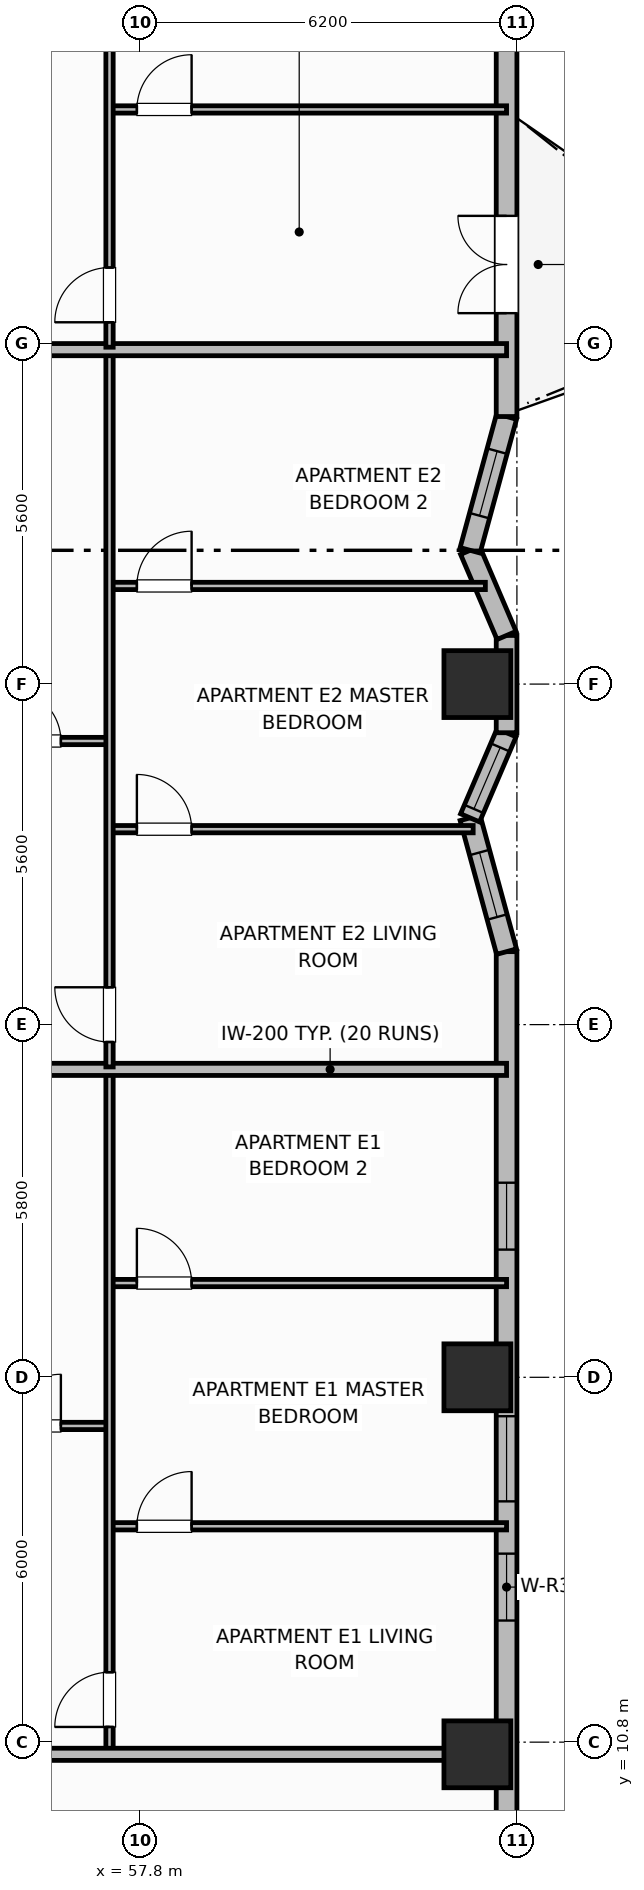
"""IFC4 building model, lengths in metres.
Left out: names, types, materials, properties, quantities, classifications, styles, units other than length and angle.
Written with IfcOpenShell. Run it as: python <this file> out.ifc"""

import sys

from ifc_helpers import new_model, si_unit, direction, frame, frame_2d, origin, origin_2d, place, context, subcontext, project, spatial, rectangle, extrude, element, fill, save


model = new_model("IFC4")
c1 = context("Model", 3, precision=1e-05, world=origin(), true_north=direction((0.0, 1.0)))
c2 = subcontext(c1, "Body", "Model", "MODEL_VIEW")
j1 = project(units=[si_unit("LENGTHUNIT", "METRE"), si_unit("PLANEANGLEUNIT", "RADIAN")], contexts=[c1])
p1 = place(None, origin())
s1 = spatial("IfcSite", under=j1, at=p1, CompositionType="ELEMENT")
p2 = place(p1, origin())
s2 = spatial("IfcBuilding", under=s1, at=p2, CompositionType="ELEMENT")
p3 = place(p2, frame((0.0, 0.0, 92.0)))
s3 = spatial("IfcBuildingStorey", under=s2, at=p3, CompositionType="ELEMENT", Elevation=92.0)
for number, where, z_axis, x_axis in (
    (1, (63.35, 10.6, 0.0), (0.0, 0.0, 1.0), (1.0, 0.0, 0.0)),
    (2, (63.35, 16.8, 0.0), (0.0, 0.0, 1.0), (1.0, 0.0, 0.0)),
    (3, (63.35, 28.2, 0.0), (0.0, 0.0, 1.0), (1.0, 0.0, 0.0)),
):
    element("IfcColumn", number, at=place(p3, frame(where, z_axis=z_axis, x_axis=x_axis)), inside=s3, PredefinedType="COLUMN", context=c2, shape_type="SweptSolid", body=[
        extrude(rectangle(XDim=1.1, YDim=1.1, at=origin_2d()), origin(), (0.0, 0.0, 1.0), 3.7),
    ])
p4 = place(p3, frame((63.83, 9.0, 0.0), z_axis=(0.0, 0.0, 1.0), x_axis=(0.0, 1.0, 0.0)))
e4 = element("IfcWall", 4, at=p4, inside=s3, PredefinedType="SOLIDWALL", context=c2, shape_type="SweptSolid", body=[
    extrude(rectangle(XDim=14.8, YDim=0.34, at=frame_2d((7.4, 0.0))), origin(), (0.0, 0.0, 1.0), 2.7),
])
p5 = place(p4, frame((3.8, 0.0, 0.93)))
e5 = element("IfcOpeningElement", 5, at=p5, cuts=e4, PredefinedType="OPENING", context=c2, shape_type="SweptSolid", body=[
    extrude(rectangle(XDim=1.1, YDim=1.65, at=frame_2d((0.55, 0.825))), frame((0.0, 0.18, 0.0), z_axis=(0.0, -1.0, 0.0), x_axis=(1.0, 0.0, 0.0)), (0.0, 0.0, 1.0), 0.36),
])
p6 = place(p4, frame((5.76, 0.0, 0.69)))
e6 = element("IfcOpeningElement", 6, at=p6, cuts=e4, PredefinedType="OPENING", context=c2, shape_type="SweptSolid", body=[
    extrude(rectangle(XDim=1.4, YDim=1.85, at=frame_2d((0.7, 0.925))), frame((0.0, 0.18, 0.0), z_axis=(0.0, -1.0, 0.0), x_axis=(1.0, 0.0, 0.0)), (0.0, 0.0, 1.0), 0.36),
])
p7 = place(p4, frame((9.9, 0.0, 0.93)))
e7 = element("IfcOpeningElement", 7, at=p7, cuts=e4, PredefinedType="OPENING", context=c2, shape_type="SweptSolid", body=[
    extrude(rectangle(XDim=1.1, YDim=1.65, at=frame_2d((0.55, 0.825))), frame((0.0, 0.18, 0.0), z_axis=(0.0, -1.0, 0.0), x_axis=(1.0, 0.0, 0.0)), (0.0, 0.0, 1.0), 0.36),
])
p8 = place(p3, frame((63.83, 23.8, 0.0), z_axis=(0.0, 0.0, 1.0), x_axis=(-0.263162701705, 0.964751466665, 0.0)))
e8 = element("IfcWall", 8, at=p8, inside=s3, PredefinedType="SOLIDWALL", context=c2, shape_type="SweptSolid", body=[
    extrude(rectangle(XDim=2.28, YDim=0.34, at=frame_2d((1.14, 0.0))), origin(), (0.0, 0.0, 1.0), 2.7),
])
p9 = place(p8, frame((0.59, 0.0, 0.89)))
e9 = element("IfcOpeningElement", 9, at=p9, cuts=e8, PredefinedType="OPENING", context=c2, shape_type="SweptSolid", body=[
    extrude(rectangle(XDim=1.1, YDim=1.65, at=frame_2d((0.55, 0.825))), frame((0.0, 0.18, 0.0), z_axis=(0.0, -1.0, 0.0), x_axis=(1.0, 0.0, 0.0)), (0.0, 0.0, 1.0), 0.36),
])
p10 = place(p3, frame((63.23, 26.0, 0.0), z_axis=(0.0, 0.0, 1.0), x_axis=(0.39399667932, 0.919111862988, 0.0)))
e10 = element("IfcWall", 10, at=p10, inside=s3, PredefinedType="SOLIDWALL", context=c2, shape_type="SweptSolid", body=[
    extrude(rectangle(XDim=1.523, YDim=0.34, at=frame_2d((0.762, 0.0))), origin(), (0.0, 0.0, 1.0), 2.7),
])
p11 = place(p10, frame((0.16, 0.0, 0.89)))
e11 = element("IfcOpeningElement", 11, at=p11, cuts=e10, PredefinedType="OPENING", context=c2, shape_type="SweptSolid", body=[
    extrude(rectangle(XDim=1.1, YDim=1.65, at=frame_2d((0.55, 0.825))), frame((0.0, 0.18, 0.0), z_axis=(0.0, -1.0, 0.0), x_axis=(1.0, 0.0, 0.0)), (0.0, 0.0, 1.0), 0.36),
])
p12 = place(p3, frame((63.83, 27.4, 0.0), z_axis=(0.0, 0.0, 1.0), x_axis=(0.0, 1.0, 0.0)))
e12 = element("IfcWall", 12, at=p12, inside=s3, PredefinedType="SOLIDWALL", context=c2, shape_type="SweptSolid", body=[
    extrude(rectangle(XDim=1.6, YDim=0.34, at=frame_2d((0.8, 0.0))), origin(), (0.0, 0.0, 1.0), 2.7),
])
p13 = place(p3, frame((63.83, 29.0, 0.0), z_axis=(0.0, 0.0, 1.0), x_axis=(-0.39399667932, 0.919111862988, 0.0)))
e13 = element("IfcWall", 13, at=p13, inside=s3, PredefinedType="SOLIDWALL", context=c2, shape_type="SweptSolid", body=[
    extrude(rectangle(XDim=1.523, YDim=0.34, at=frame_2d((0.762, 0.0))), origin(), (0.0, 0.0, 1.0), 2.7),
])
p14 = place(p3, frame((63.23, 30.4, 0.0), z_axis=(0.0, 0.0, 1.0), x_axis=(0.263135522356, 0.964758880174, 0.0)))
e14 = element("IfcWall", 14, at=p14, inside=s3, PredefinedType="SOLIDWALL", context=c2, shape_type="SweptSolid", body=[
    extrude(rectangle(XDim=2.281, YDim=0.34, at=frame_2d((1.14, 0.0))), origin(), (0.0, 0.0, 1.0), 2.7),
])
p15 = place(p14, frame((0.59, 0.0, 0.89)))
e15 = element("IfcOpeningElement", 15, at=p15, cuts=e14, PredefinedType="OPENING", context=c2, shape_type="SweptSolid", body=[
    extrude(rectangle(XDim=1.1, YDim=1.65, at=frame_2d((0.55, 0.825))), frame((0.0, 0.18, 0.0), z_axis=(0.0, -1.0, 0.0), x_axis=(1.0, 0.0, 0.0)), (0.0, 0.0, 1.0), 0.36),
])
p16 = place(p3, frame((63.83, 32.6, 0.0), z_axis=(0.0, 0.0, 1.0), x_axis=(0.0, 1.0, 0.0)))
e16 = element("IfcWall", 16, at=p16, inside=s3, PredefinedType="SOLIDWALL", context=c2, shape_type="SweptSolid", body=[
    extrude(rectangle(XDim=14.8, YDim=0.34, at=frame_2d((7.4, 0.0))), origin(), (0.0, 0.0, 1.0), 2.7),
])
p17 = place(p16, frame((1.7, 0.0, 0.0)))
e17 = element("IfcOpeningElement", 17, at=p17, cuts=e16, PredefinedType="OPENING", context=c2, shape_type="SweptSolid", body=[
    extrude(rectangle(XDim=1.6, YDim=2.1, at=frame_2d((0.8, 1.05))), frame((0.0, 0.18, 0.0), z_axis=(0.0, -1.0, 0.0), x_axis=(1.0, 0.0, 0.0)), (0.0, 0.0, 1.0), 0.36),
])
p18 = place(p16, frame((7.6, 0.0, 0.69)))
e18 = element("IfcOpeningElement", 18, at=p18, cuts=e16, PredefinedType="OPENING", context=c2, shape_type="SweptSolid", body=[
    extrude(rectangle(XDim=1.4, YDim=1.85, at=frame_2d((0.7, 0.925))), frame((0.0, 0.18, 0.0), z_axis=(0.0, -1.0, 0.0), x_axis=(1.0, 0.0, 0.0)), (0.0, 0.0, 1.0), 0.36),
])
p19 = place(p16, frame((9.8, 0.0, 0.68)))
e19 = element("IfcOpeningElement", 19, at=p19, cuts=e16, PredefinedType="OPENING", context=c2, shape_type="SweptSolid", body=[
    extrude(rectangle(XDim=2.1, YDim=1.9, at=frame_2d((1.05, 0.95))), frame((0.0, 0.18, 0.0), z_axis=(0.0, -1.0, 0.0), x_axis=(1.0, 0.0, 0.0)), (0.0, 0.0, 1.0), 0.36),
])
p20 = place(p3, frame((55.05, 16.0, 0.0), z_axis=(0.0, 0.0, 1.0), x_axis=(1.0, 0.0, 0.0)))
e20 = element("IfcWall", 20, at=p20, inside=s3, PredefinedType="PARTITIONING", context=c2, shape_type="SweptSolid", body=[
    extrude(rectangle(XDim=2.25, YDim=0.12, at=frame_2d((1.125, 0.0))), origin(), (0.0, 0.0, 1.0), 2.53),
])
p21 = place(p20, frame((0.6, 0.0, 0.0)))
e21 = element("IfcOpeningElement", 21, at=p21, cuts=e20, PredefinedType="OPENING", context=c2, shape_type="SweptSolid", body=[
    extrude(rectangle(XDim=0.85, YDim=2.1, at=frame_2d((0.425, 1.05))), frame((0.0, 0.07, 0.0), z_axis=(0.0, -1.0, 0.0), x_axis=(1.0, 0.0, 0.0)), (0.0, 0.0, 1.0), 0.14),
])
p22 = place(p3, frame((57.3, 14.35, 0.0), z_axis=(0.0, 0.0, 1.0), x_axis=(1.0, 0.0, 0.0)))
e22 = element("IfcWall", 22, at=p22, inside=s3, PredefinedType="PARTITIONING", context=c2, shape_type="SweptSolid", body=[
    extrude(rectangle(XDim=6.53, YDim=0.12, at=frame_2d((3.265, 0.0))), origin(), (0.0, 0.0, 1.0), 2.53),
])
p23 = place(p22, frame((0.45, 0.0, 0.0)))
e23 = element("IfcOpeningElement", 23, at=p23, cuts=e22, PredefinedType="OPENING", context=c2, shape_type="SweptSolid", body=[
    extrude(rectangle(XDim=0.9, YDim=2.1, at=frame_2d((0.45, 1.05))), frame((0.0, 0.07, 0.0), z_axis=(0.0, -1.0, 0.0), x_axis=(1.0, 0.0, 0.0)), (0.0, 0.0, 1.0), 0.14),
])
p24 = place(p3, frame((57.3, 18.35, 0.0), z_axis=(0.0, 0.0, 1.0), x_axis=(1.0, 0.0, 0.0)))
e24 = element("IfcWall", 24, at=p24, inside=s3, PredefinedType="PARTITIONING", context=c2, shape_type="SweptSolid", body=[
    extrude(rectangle(XDim=6.53, YDim=0.12, at=frame_2d((3.265, 0.0))), origin(), (0.0, 0.0, 1.0), 2.53),
])
p25 = place(p24, frame((0.45, 0.0, 0.0)))
e25 = element("IfcOpeningElement", 25, at=p25, cuts=e24, PredefinedType="OPENING", context=c2, shape_type="SweptSolid", body=[
    extrude(rectangle(XDim=0.9, YDim=2.1, at=frame_2d((0.45, 1.05))), frame((0.0, 0.07, 0.0), z_axis=(0.0, -1.0, 0.0), x_axis=(1.0, 0.0, 0.0)), (0.0, 0.0, 1.0), 0.14),
])
p26 = place(p3, frame((57.3, 10.64, 0.0), z_axis=(0.0, 0.0, 1.0), x_axis=(0.0, 1.0, 0.0)))
e26 = element("IfcWall", 26, at=p26, inside=s3, PredefinedType="PARTITIONING", context=c2, shape_type="SweptSolid", body=[
    extrude(rectangle(XDim=11.184, YDim=0.12, at=frame_2d((5.592, 0.0))), origin(), (0.0, 0.0, 1.0), 2.53),
])
p27 = place(p26, frame((0.41, 0.0, 0.0)))
e27 = element("IfcOpeningElement", 27, at=p27, cuts=e26, PredefinedType="OPENING", context=c2, shape_type="SweptSolid", body=[
    extrude(rectangle(XDim=0.9, YDim=2.1, at=frame_2d((0.45, 1.05))), frame((0.0, 0.07, 0.0), z_axis=(0.0, -1.0, 0.0), x_axis=(1.0, 0.0, 0.0)), (0.0, 0.0, 1.0), 0.14),
])
p28 = place(p3, frame((55.05, 21.864, 0.0), z_axis=(0.0, 0.0, 1.0), x_axis=(1.0, 0.0, 0.0)))
e28 = element("IfcWall", 28, at=p28, inside=s3, PredefinedType="PARTITIONING", context=c2, shape_type="SweptSolid", body=[
    extrude(rectangle(XDim=8.78, YDim=0.2, at=frame_2d((4.39, 0.0))), origin(), (0.0, 0.0, 1.0), 2.53),
])
p29 = place(p3, frame((55.05, 27.264, 0.0), z_axis=(0.0, 0.0, 1.0), x_axis=(1.0, 0.0, 0.0)))
e29 = element("IfcWall", 29, at=p29, inside=s3, PredefinedType="PARTITIONING", context=c2, shape_type="SweptSolid", body=[
    extrude(rectangle(XDim=2.25, YDim=0.12, at=frame_2d((1.125, 0.0))), origin(), (0.0, 0.0, 1.0), 2.53),
])
p30 = place(p29, frame((0.6, 0.0, 0.0)))
e30 = element("IfcOpeningElement", 30, at=p30, cuts=e29, PredefinedType="OPENING", context=c2, shape_type="SweptSolid", body=[
    extrude(rectangle(XDim=0.85, YDim=2.1, at=frame_2d((0.425, 1.05))), frame((0.0, 0.07, 0.0), z_axis=(0.0, -1.0, 0.0), x_axis=(1.0, 0.0, 0.0)), (0.0, 0.0, 1.0), 0.14),
])
p31 = place(p3, frame((57.3, 25.814, 0.0), z_axis=(0.0, 0.0, 1.0), x_axis=(1.0, 0.0, 0.0)))
e31 = element("IfcWall", 31, at=p31, inside=s3, PredefinedType="PARTITIONING", context=c2, shape_type="SweptSolid", body=[
    extrude(rectangle(XDim=5.981, YDim=0.12, at=frame_2d((2.99, 0.0))), origin(), (0.0, 0.0, 1.0), 2.53),
])
p32 = place(p31, frame((0.45, 0.0, 0.0)))
e32 = element("IfcOpeningElement", 32, at=p32, cuts=e31, PredefinedType="OPENING", context=c2, shape_type="SweptSolid", body=[
    extrude(rectangle(XDim=0.9, YDim=2.1, at=frame_2d((0.45, 1.05))), frame((0.0, 0.07, 0.0), z_axis=(0.0, -1.0, 0.0), x_axis=(1.0, 0.0, 0.0)), (0.0, 0.0, 1.0), 0.14),
])
p33 = place(p3, frame((57.3, 29.814, 0.0), z_axis=(0.0, 0.0, 1.0), x_axis=(1.0, 0.0, 0.0)))
e33 = element("IfcWall", 33, at=p33, inside=s3, PredefinedType="PARTITIONING", context=c2, shape_type="SweptSolid", body=[
    extrude(rectangle(XDim=6.181, YDim=0.12, at=frame_2d((3.091, 0.0))), origin(), (0.0, 0.0, 1.0), 2.53),
])
p34 = place(p33, frame((0.45, 0.0, 0.0)))
e34 = element("IfcOpeningElement", 34, at=p34, cuts=e33, PredefinedType="OPENING", context=c2, shape_type="SweptSolid", body=[
    extrude(rectangle(XDim=0.9, YDim=2.1, at=frame_2d((0.45, 1.05))), frame((0.0, 0.07, 0.0), z_axis=(0.0, -1.0, 0.0), x_axis=(1.0, 0.0, 0.0)), (0.0, 0.0, 1.0), 0.14),
])
p35 = place(p3, frame((57.3, 21.904, 0.0), z_axis=(0.0, 0.0, 1.0), x_axis=(0.0, 1.0, 0.0)))
e35 = element("IfcWall", 35, at=p35, inside=s3, PredefinedType="PARTITIONING", context=c2, shape_type="SweptSolid", body=[
    extrude(rectangle(XDim=11.756, YDim=0.12, at=frame_2d((5.878, 0.0))), origin(), (0.0, 0.0, 1.0), 2.53),
])
p36 = place(p35, frame((0.41, 0.0, 0.0)))
e36 = element("IfcOpeningElement", 36, at=p36, cuts=e35, PredefinedType="OPENING", context=c2, shape_type="SweptSolid", body=[
    extrude(rectangle(XDim=0.9, YDim=2.1, at=frame_2d((0.45, 1.05))), frame((0.0, 0.07, 0.0), z_axis=(0.0, -1.0, 0.0), x_axis=(1.0, 0.0, 0.0)), (0.0, 0.0, 1.0), 0.14),
])
p37 = place(p3, frame((55.05, 33.7, 0.0), z_axis=(0.0, 0.0, 1.0), x_axis=(1.0, 0.0, 0.0)))
e37 = element("IfcWall", 37, at=p37, inside=s3, PredefinedType="PARTITIONING", context=c2, shape_type="SweptSolid", body=[
    extrude(rectangle(XDim=8.78, YDim=0.2, at=frame_2d((4.39, 0.0))), origin(), (0.0, 0.0, 1.0), 2.53),
])
p38 = place(p3, frame((57.3, 37.65, 0.0), z_axis=(0.0, 0.0, 1.0), x_axis=(1.0, 0.0, 0.0)))
e38 = element("IfcWall", 38, at=p38, inside=s3, PredefinedType="PARTITIONING", context=c2, shape_type="SweptSolid", body=[
    extrude(rectangle(XDim=6.53, YDim=0.12, at=frame_2d((3.265, 0.0))), origin(), (0.0, 0.0, 1.0), 2.53),
])
p39 = place(p38, frame((0.45, 0.0, 0.0)))
e39 = element("IfcOpeningElement", 39, at=p39, cuts=e38, PredefinedType="OPENING", context=c2, shape_type="SweptSolid", body=[
    extrude(rectangle(XDim=0.9, YDim=2.1, at=frame_2d((0.45, 1.05))), frame((0.0, 0.07, 0.0), z_axis=(0.0, -1.0, 0.0), x_axis=(1.0, 0.0, 0.0)), (0.0, 0.0, 1.0), 0.14),
])
p40 = place(p3, frame((57.3, 33.74, 0.0), z_axis=(0.0, 0.0, 1.0), x_axis=(0.0, 1.0, 0.0)))
e40 = element("IfcWall", 40, at=p40, inside=s3, PredefinedType="PARTITIONING", context=c2, shape_type="SweptSolid", body=[
    extrude(rectangle(XDim=12.02, YDim=0.12, at=frame_2d((6.01, 0.0))), origin(), (0.0, 0.0, 1.0), 2.53),
])
p41 = place(p40, frame((0.41, 0.0, 0.0)))
e41 = element("IfcOpeningElement", 41, at=p41, cuts=e40, PredefinedType="OPENING", context=c2, shape_type="SweptSolid", body=[
    extrude(rectangle(XDim=0.9, YDim=2.1, at=frame_2d((0.45, 1.05))), frame((0.0, 0.07, 0.0), z_axis=(0.0, -1.0, 0.0), x_axis=(1.0, 0.0, 0.0)), (0.0, 0.0, 1.0), 0.14),
])
p42 = place(p40, frame((10.185, 0.0, 0.0)))
e42 = element("IfcOpeningElement", 42, at=p42, cuts=e40, PredefinedType="OPENING", context=c2, shape_type="SweptSolid", body=[
    extrude(rectangle(XDim=0.82, YDim=2.08, at=frame_2d((0.41, 1.04))), frame((0.0, 0.07, 0.0), z_axis=(0.0, -1.0, 0.0), x_axis=(1.0, 0.0, 0.0)), (0.0, 0.0, 1.0), 0.14),
])
p43 = place(p3, frame((55.05, 10.6, 0.0), z_axis=(0.0, 0.0, 1.0), x_axis=(1.0, 0.0, 0.0)))
e43 = element("IfcWall", 43, at=p43, inside=s3, PredefinedType="PARTITIONING", context=c2, shape_type="SweptSolid", body=[
    extrude(rectangle(XDim=8.36, YDim=0.2, at=frame_2d((4.18, 0.0))), origin(), (0.0, 0.0, 1.0), 2.53),
])
p44 = place(p5, origin())
e44 = element("IfcWindow", 44, at=p44, inside=s3, PartitioningType="SINGLE_PANEL", PredefinedType="WINDOW", context=c2, shape_type="SweptSolid", body=[
    extrude(rectangle(XDim=1.1, YDim=1.65, at=frame_2d((0.55, 0.825))), frame((0.0, 0.03, 0.0), z_axis=(0.0, -1.0, 0.0), x_axis=(1.0, 0.0, 0.0)), (0.0, 0.0, 1.0), 0.06),
])
fill(e5, e44)
p45 = place(p6, origin())
e45 = element("IfcWindow", 45, at=p45, inside=s3, PartitioningType="SINGLE_PANEL", PredefinedType="WINDOW", context=c2, shape_type="SweptSolid", body=[
    extrude(rectangle(XDim=1.4, YDim=1.85, at=frame_2d((0.7, 0.925))), frame((0.0, 0.03, 0.0), z_axis=(0.0, -1.0, 0.0), x_axis=(1.0, 0.0, 0.0)), (0.0, 0.0, 1.0), 0.06),
])
fill(e6, e45)
p46 = place(p7, origin())
e46 = element("IfcWindow", 46, at=p46, inside=s3, PartitioningType="SINGLE_PANEL", PredefinedType="WINDOW", context=c2, shape_type="SweptSolid", body=[
    extrude(rectangle(XDim=1.1, YDim=1.65, at=frame_2d((0.55, 0.825))), frame((0.0, 0.03, 0.0), z_axis=(0.0, -1.0, 0.0), x_axis=(1.0, 0.0, 0.0)), (0.0, 0.0, 1.0), 0.06),
])
fill(e7, e46)
p47 = place(p9, origin())
e47 = element("IfcWindow", 47, at=p47, inside=s3, PartitioningType="SINGLE_PANEL", PredefinedType="WINDOW", context=c2, shape_type="SweptSolid", body=[
    extrude(rectangle(XDim=1.1, YDim=1.65, at=frame_2d((0.55, 0.825))), frame((0.0, 0.03, 0.0), z_axis=(0.0, -1.0, 0.0), x_axis=(1.0, 0.0, 0.0)), (0.0, 0.0, 1.0), 0.06),
])
fill(e9, e47)
p48 = place(p11, origin())
e48 = element("IfcWindow", 48, at=p48, inside=s3, PartitioningType="SINGLE_PANEL", PredefinedType="WINDOW", context=c2, shape_type="SweptSolid", body=[
    extrude(rectangle(XDim=1.1, YDim=1.65, at=frame_2d((0.55, 0.825))), frame((0.0, 0.03, 0.0), z_axis=(0.0, -1.0, 0.0), x_axis=(1.0, 0.0, 0.0)), (0.0, 0.0, 1.0), 0.06),
])
fill(e11, e48)
p49 = place(p15, origin())
e49 = element("IfcWindow", 49, at=p49, inside=s3, PartitioningType="SINGLE_PANEL", PredefinedType="WINDOW", context=c2, shape_type="SweptSolid", body=[
    extrude(rectangle(XDim=1.1, YDim=1.65, at=frame_2d((0.55, 0.825))), frame((0.0, 0.03, 0.0), z_axis=(0.0, -1.0, 0.0), x_axis=(1.0, 0.0, 0.0)), (0.0, 0.0, 1.0), 0.06),
])
fill(e15, e49)
p50 = place(p17, origin())
e50 = element("IfcDoor", 50, at=p50, inside=s3, OperationType="DOUBLE_DOOR_SINGLE_SWING", PredefinedType="DOOR", context=c2, shape_type="SweptSolid", body=[
    extrude(rectangle(XDim=1.6, YDim=2.1, at=frame_2d((0.8, 1.05))), frame((0.0, 0.025, 0.0), z_axis=(0.0, -1.0, 0.0), x_axis=(1.0, 0.0, 0.0)), (0.0, 0.0, 1.0), 0.05),
])
fill(e17, e50)
p51 = place(p21, origin())
e51 = element("IfcDoor", 51, at=p51, inside=s3, OperationType="SINGLE_SWING_RIGHT", PredefinedType="DOOR", context=c2, shape_type="SweptSolid", body=[
    extrude(rectangle(XDim=0.85, YDim=2.1, at=frame_2d((0.425, 1.05))), frame((0.0, 0.025, 0.0), z_axis=(0.0, -1.0, 0.0), x_axis=(1.0, 0.0, 0.0)), (0.0, 0.0, 1.0), 0.05),
])
fill(e21, e51)
p52 = place(p23, origin())
e52 = element("IfcDoor", 52, at=p52, inside=s3, OperationType="SINGLE_SWING_RIGHT", PredefinedType="DOOR", context=c2, shape_type="SweptSolid", body=[
    extrude(rectangle(XDim=0.9, YDim=2.1, at=frame_2d((0.45, 1.05))), frame((0.0, 0.025, 0.0), z_axis=(0.0, -1.0, 0.0), x_axis=(1.0, 0.0, 0.0)), (0.0, 0.0, 1.0), 0.05),
])
fill(e23, e52)
p53 = place(p25, origin())
e53 = element("IfcDoor", 53, at=p53, inside=s3, OperationType="SINGLE_SWING_LEFT", PredefinedType="DOOR", context=c2, shape_type="SweptSolid", body=[
    extrude(rectangle(XDim=0.9, YDim=2.1, at=frame_2d((0.45, 1.05))), frame((0.0, 0.025, 0.0), z_axis=(0.0, -1.0, 0.0), x_axis=(1.0, 0.0, 0.0)), (0.0, 0.0, 1.0), 0.05),
])
fill(e25, e53)
p54 = place(p27, origin())
e54 = element("IfcDoor", 54, at=p54, inside=s3, OperationType="SINGLE_SWING_LEFT", PredefinedType="DOOR", context=c2, shape_type="SweptSolid", body=[
    extrude(rectangle(XDim=0.9, YDim=2.1, at=frame_2d((0.45, 1.05))), frame((0.0, 0.025, 0.0), z_axis=(0.0, -1.0, 0.0), x_axis=(1.0, 0.0, 0.0)), (0.0, 0.0, 1.0), 0.05),
])
fill(e27, e54)
p55 = place(p30, origin())
e55 = element("IfcDoor", 55, at=p55, inside=s3, OperationType="SINGLE_SWING_LEFT", PredefinedType="DOOR", context=c2, shape_type="SweptSolid", body=[
    extrude(rectangle(XDim=0.85, YDim=2.1, at=frame_2d((0.425, 1.05))), frame((0.0, 0.025, 0.0), z_axis=(0.0, -1.0, 0.0), x_axis=(1.0, 0.0, 0.0)), (0.0, 0.0, 1.0), 0.05),
])
fill(e30, e55)
p56 = place(p32, origin())
e56 = element("IfcDoor", 56, at=p56, inside=s3, OperationType="SINGLE_SWING_LEFT", PredefinedType="DOOR", context=c2, shape_type="SweptSolid", body=[
    extrude(rectangle(XDim=0.9, YDim=2.1, at=frame_2d((0.45, 1.05))), frame((0.0, 0.025, 0.0), z_axis=(0.0, -1.0, 0.0), x_axis=(1.0, 0.0, 0.0)), (0.0, 0.0, 1.0), 0.05),
])
fill(e32, e56)
p57 = place(p34, origin())
e57 = element("IfcDoor", 57, at=p57, inside=s3, OperationType="SINGLE_SWING_RIGHT", PredefinedType="DOOR", context=c2, shape_type="SweptSolid", body=[
    extrude(rectangle(XDim=0.9, YDim=2.1, at=frame_2d((0.45, 1.05))), frame((0.0, 0.025, 0.0), z_axis=(0.0, -1.0, 0.0), x_axis=(1.0, 0.0, 0.0)), (0.0, 0.0, 1.0), 0.05),
])
fill(e34, e57)
p58 = place(p36, origin())
e58 = element("IfcDoor", 58, at=p58, inside=s3, OperationType="SINGLE_SWING_RIGHT", PredefinedType="DOOR", context=c2, shape_type="SweptSolid", body=[
    extrude(rectangle(XDim=0.9, YDim=2.1, at=frame_2d((0.45, 1.05))), frame((0.0, 0.025, 0.0), z_axis=(0.0, -1.0, 0.0), x_axis=(1.0, 0.0, 0.0)), (0.0, 0.0, 1.0), 0.05),
])
fill(e36, e58)
p59 = place(p39, origin())
e59 = element("IfcDoor", 59, at=p59, inside=s3, OperationType="SINGLE_SWING_RIGHT", PredefinedType="DOOR", context=c2, shape_type="SweptSolid", body=[
    extrude(rectangle(XDim=0.9, YDim=2.1, at=frame_2d((0.45, 1.05))), frame((0.0, 0.025, 0.0), z_axis=(0.0, -1.0, 0.0), x_axis=(1.0, 0.0, 0.0)), (0.0, 0.0, 1.0), 0.05),
])
fill(e39, e59)
p60 = place(p41, origin())
e60 = element("IfcDoor", 60, at=p60, inside=s3, OperationType="SINGLE_SWING_LEFT", PredefinedType="DOOR", context=c2, shape_type="SweptSolid", body=[
    extrude(rectangle(XDim=0.9, YDim=2.1, at=frame_2d((0.45, 1.05))), frame((0.0, 0.025, 0.0), z_axis=(0.0, -1.0, 0.0), x_axis=(1.0, 0.0, 0.0)), (0.0, 0.0, 1.0), 0.05),
])
fill(e41, e60)
save(model, sys.argv[1])
